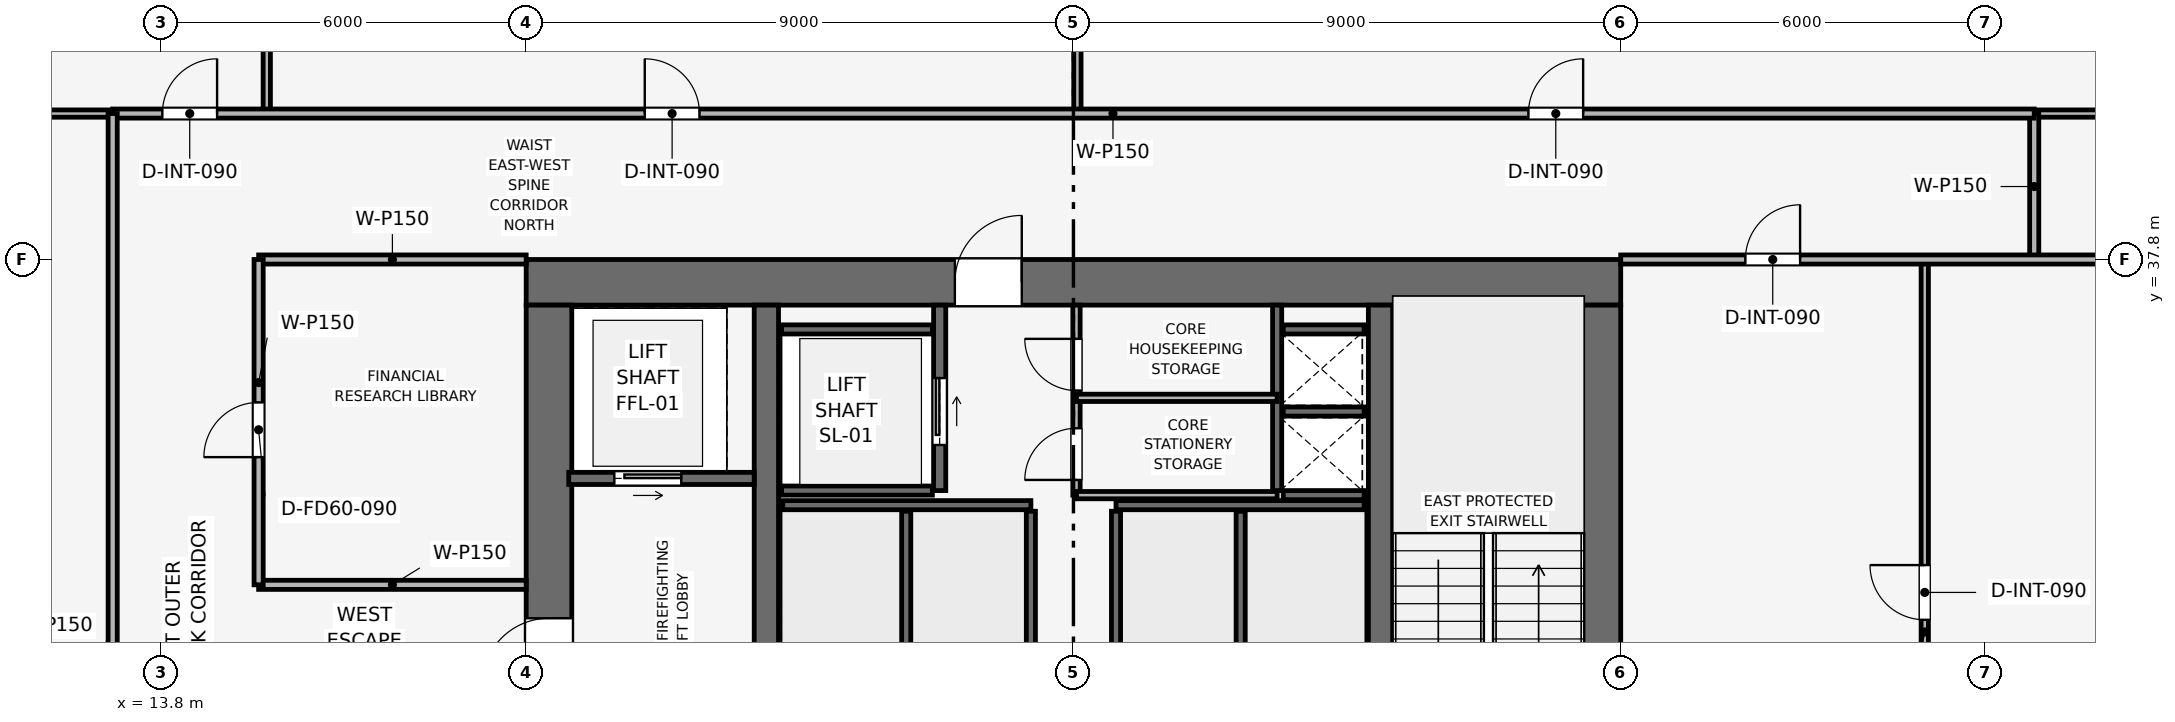
"""IFC4 building model, lengths in metres.
Left out: names, types, materials, properties, quantities, classifications, styles, units other than length and angle.
Written with IfcOpenShell. Run it as: python <this file> out.ifc"""

import sys

from ifc_helpers import new_model, si_unit, direction, frame, frame_2d, origin, place, context, subcontext, project, spatial, rectangle, extrude, element, fill, save


model = new_model("IFC4")
c1 = context("Model", 3, precision=1e-05, world=origin(), true_north=direction((0.0, 1.0)))
c2 = subcontext(c1, "Body", "Model", "MODEL_VIEW")
j1 = project(units=[si_unit("LENGTHUNIT", "METRE"), si_unit("PLANEANGLEUNIT", "RADIAN")], contexts=[c1])
p1 = place(None, origin())
s1 = spatial("IfcSite", under=j1, at=p1, CompositionType="ELEMENT")
p2 = place(p1, origin())
s2 = spatial("IfcBuilding", under=s1, at=p2, CompositionType="ELEMENT")
p3 = place(p2, frame((0.0, 0.0, 211.2)))
s3 = spatial("IfcBuildingStorey", under=s2, at=p3, CompositionType="ELEMENT", Elevation=211.2)
p4 = place(p3, frame((19.8, 37.425, 0.0), z_axis=(0.0, 0.0, 1.0), x_axis=(1.0, 0.0, 0.0)))
e1 = element("IfcWall", 1, at=p4, inside=s3, PredefinedType="SHEAR", context=c2, shape_type="SweptSolid", body=[
    extrude(rectangle(XDim=18.0, YDim=0.75, at=frame_2d((9.0, 0.0))), origin(), (0.0, 0.0, 1.0), 3.75),
])
p5 = place(p4, frame((7.05, 0.0, 0.0)))
e2 = element("IfcOpeningElement", 2, at=p5, cuts=e1, PredefinedType="OPENING", context=c2, shape_type="SweptSolid", body=[
    extrude(rectangle(XDim=1.1, YDim=2.15, at=frame_2d((0.55, 1.075))), frame((0.0, 0.385, 0.0), z_axis=(0.0, -1.0, 0.0), x_axis=(1.0, 0.0, 0.0)), (0.0, 0.0, 1.0), 0.77),
])
p6 = place(p3, frame((20.175, 20.55, 0.0), z_axis=(0.0, 0.0, 1.0), x_axis=(0.0, 1.0, 0.0)))
e3 = element("IfcWall", 3, at=p6, inside=s3, PredefinedType="SHEAR", context=c2, shape_type="SweptSolid", body=[
    extrude(rectangle(XDim=16.5, YDim=0.75, at=frame_2d((8.25, 0.0))), origin(), (0.0, 0.0, 1.0), 3.75),
])
p7 = place(p6, frame((10.25, 0.0, 0.0)))
e4 = element("IfcOpeningElement", 4, at=p7, cuts=e3, PredefinedType="OPENING", context=c2, shape_type="SweptSolid", body=[
    extrude(rectangle(XDim=1.1, YDim=2.15, at=frame_2d((0.55, 1.075))), frame((0.0, 0.385, 0.0), z_axis=(0.0, -1.0, 0.0), x_axis=(1.0, 0.0, 0.0)), (0.0, 0.0, 1.0), 0.77),
])
p8 = place(p3, frame((37.425, 20.55, 0.0), z_axis=(0.0, 0.0, 1.0), x_axis=(0.0, 1.0, 0.0)))
e5 = element("IfcWall", 5, at=p8, inside=s3, PredefinedType="SHEAR", context=c2, shape_type="SweptSolid", body=[
    extrude(rectangle(XDim=16.5, YDim=0.75, at=frame_2d((8.25, 0.0))), origin(), (0.0, 0.0, 1.0), 3.75),
])
p9 = place(p8, frame((4.75, 0.0, 0.0)))
e6 = element("IfcOpeningElement", 6, at=p9, cuts=e5, PredefinedType="OPENING", context=c2, shape_type="SweptSolid", body=[
    extrude(rectangle(XDim=1.1, YDim=2.15, at=frame_2d((0.55, 1.075))), frame((0.0, 0.385, 0.0), z_axis=(0.0, -1.0, 0.0), x_axis=(1.0, 0.0, 0.0)), (0.0, 0.0, 1.0), 0.77),
])
for number, where, z_axis, x_axis in (
    (7, (23.75, 20.55, 0.0), (0.0, 0.0, 1.0), (0.0, 1.0, 0.0)),
    (8, (33.85, 20.55, 0.0), (0.0, 0.0, 1.0), (0.0, 1.0, 0.0)),
):
    element("IfcWall", number, at=place(p3, frame(where, z_axis=z_axis, x_axis=x_axis)), inside=s3, PredefinedType="SHEAR", context=c2, shape_type="SweptSolid", body=[
        extrude(rectangle(XDim=16.5, YDim=0.4, at=frame_2d((8.25, 0.0))), origin(), (0.0, 0.0, 1.0), 3.75),
    ])
p10 = place(p3, frame((32.15, 34.0, 0.0), z_axis=(0.0, 0.0, 1.0), x_axis=(0.0, 1.0, 0.0)))
e9 = element("IfcWall", 9, at=p10, inside=s3, PredefinedType="SHEAR", context=c2, shape_type="SweptSolid", body=[
    extrude(rectangle(XDim=3.05, YDim=0.15, at=frame_2d((1.525, 0.0))), origin(), (0.0, 0.0, 1.0), 3.5),
])
for number, where, z_axis, x_axis in (
    (10, (32.25, 33.925, 0.0), (0.0, 0.0, 1.0), (1.0, 0.0, 0.0)),
    (11, (32.25, 35.3, 0.0), (0.0, 0.0, 1.0), (1.0, 0.0, 0.0)),
):
    element("IfcWall", number, at=place(p3, frame(where, z_axis=z_axis, x_axis=x_axis)), inside=s3, PredefinedType="SHEAR", context=c2, shape_type="SweptSolid", body=[
        extrude(rectangle(XDim=1.33, YDim=0.15, at=frame_2d((0.665, 0.0))), origin(), (0.0, 0.0, 1.0), 3.5),
    ])
p11 = place(p3, frame((20.5, 34.2, 0.0), z_axis=(0.0, 0.0, 1.0), x_axis=(1.0, 0.0, 0.0)))
e12 = element("IfcWall", 12, at=p11, inside=s3, PredefinedType="SHEAR", context=c2, shape_type="SweptSolid", body=[
    extrude(rectangle(XDim=3.05, YDim=0.2, at=frame_2d((1.525, 0.0))), origin(), (0.0, 0.0, 1.0), 3.5),
])
p12 = place(p11, frame((0.75, 0.0, 0.0)))
e13 = element("IfcOpeningElement", 13, at=p12, cuts=e12, PredefinedType="OPENING", context=c2, shape_type="SweptSolid", body=[
    extrude(rectangle(XDim=1.1, YDim=2.15, at=frame_2d((0.55, 1.075))), frame((0.0, 0.11, 0.0), z_axis=(0.0, -1.0, 0.0), x_axis=(1.0, 0.0, 0.0)), (0.0, 0.0, 1.0), 0.22),
])
p13 = place(p3, frame((26.6, 34.0, 0.0), z_axis=(0.0, 0.0, 1.0), x_axis=(0.0, 1.0, 0.0)))
e14 = element("IfcWall", 14, at=p13, inside=s3, PredefinedType="SHEAR", context=c2, shape_type="SweptSolid", body=[
    extrude(rectangle(XDim=3.05, YDim=0.2, at=frame_2d((1.525, 0.0))), origin(), (0.0, 0.0, 1.0), 3.5),
])
p14 = place(p13, frame((0.75, 0.0, 0.0)))
e15 = element("IfcOpeningElement", 15, at=p14, cuts=e14, PredefinedType="OPENING", context=c2, shape_type="SweptSolid", body=[
    extrude(rectangle(XDim=1.1, YDim=2.15, at=frame_2d((0.55, 1.075))), frame((0.0, 0.11, 0.0), z_axis=(0.0, -1.0, 0.0), x_axis=(1.0, 0.0, 0.0)), (0.0, 0.0, 1.0), 0.22),
])
for number, where, z_axis, x_axis in (
    (16, (24.0, 34.0, 0.0), (0.0, 0.0, 1.0), (1.0, 0.0, 0.0)),
    (17, (24.0, 36.65, 0.0), (0.0, 0.0, 1.0), (1.0, 0.0, 0.0)),
):
    element("IfcWall", number, at=place(p3, frame(where, z_axis=z_axis, x_axis=x_axis)), inside=s3, PredefinedType="SHEAR", context=c2, shape_type="SweptSolid", body=[
        extrude(rectangle(XDim=2.48, YDim=0.15, at=frame_2d((1.24, 0.0))), origin(), (0.0, 0.0, 1.0), 3.5),
    ])
p15 = place(p3, frame((32.25, 36.65, 0.0), z_axis=(0.0, 0.0, 1.0), x_axis=(1.0, 0.0, 0.0)))
e18 = element("IfcWall", 18, at=p15, inside=s3, PredefinedType="SHEAR", context=c2, shape_type="SweptSolid", body=[
    extrude(rectangle(XDim=1.33, YDim=0.15, at=frame_2d((0.665, 0.0))), origin(), (0.0, 0.0, 1.0), 3.5),
])
for number, where, z_axis, x_axis in (
    (19, (24.02, 33.76, 0.0), (0.0, 0.0, 1.0), (1.0, 0.0, 0.0)),
    (20, (29.5, 33.76, 0.0), (0.0, 0.0, 1.0), (1.0, 0.0, 0.0)),
):
    element("IfcWall", number, at=place(p3, frame(where, z_axis=z_axis, x_axis=x_axis)), inside=s3, PredefinedType="SHEAR", context=c2, shape_type="SweptSolid", body=[
        extrude(rectangle(XDim=4.08, YDim=0.15, at=frame_2d((2.04, 0.0))), origin(), (0.0, 0.0, 1.0), 3.5),
    ])
for number, where, z_axis, x_axis in (
    (21, (26.05, 31.42, 0.0), (0.0, 0.0, 1.0), (0.0, 1.0, 0.0)),
    (22, (28.1, 31.42, 0.0), (0.0, 0.0, 1.0), (0.0, 1.0, 0.0)),
    (23, (29.5, 31.42, 0.0), (0.0, 0.0, 1.0), (0.0, 1.0, 0.0)),
    (24, (31.55, 31.42, 0.0), (0.0, 0.0, 1.0), (0.0, 1.0, 0.0)),
):
    element("IfcWall", number, at=place(p3, frame(where, z_axis=z_axis, x_axis=x_axis)), inside=s3, PredefinedType="SHEAR", context=c2, shape_type="SweptSolid", body=[
        extrude(rectangle(XDim=2.24, YDim=0.15, at=frame_2d((1.12, 0.0))), origin(), (0.0, 0.0, 1.0), 3.5),
    ])
p16 = place(p3, frame((28.85, 33.925, 0.0), z_axis=(0.0, 0.0, 1.0), x_axis=(0.0, 1.0, 0.0)))
e25 = element("IfcWall", 25, at=p16, inside=s3, PredefinedType="PARTITIONING", context=c2, shape_type="SweptSolid", body=[
    extrude(rectangle(XDim=3.125, YDim=0.12, at=frame_2d((1.562, 0.0))), origin(), (0.0, 0.0, 1.0), 3.5),
])
p17 = place(p16, frame((0.25, 0.0, 0.0)))
e26 = element("IfcOpeningElement", 26, at=p17, cuts=e25, PredefinedType="OPENING", context=c2, shape_type="SweptSolid", body=[
    extrude(rectangle(XDim=0.85, YDim=2.1, at=frame_2d((0.425, 1.05))), frame((0.0, 0.07, 0.0), z_axis=(0.0, -1.0, 0.0), x_axis=(1.0, 0.0, 0.0)), (0.0, 0.0, 1.0), 0.14),
])
p18 = place(p16, frame((1.72, 0.0, 0.0)))
e27 = element("IfcOpeningElement", 27, at=p18, cuts=e25, PredefinedType="OPENING", context=c2, shape_type="SweptSolid", body=[
    extrude(rectangle(XDim=0.85, YDim=2.1, at=frame_2d((0.425, 1.05))), frame((0.0, 0.07, 0.0), z_axis=(0.0, -1.0, 0.0), x_axis=(1.0, 0.0, 0.0)), (0.0, 0.0, 1.0), 0.14),
])
for number, where, z_axis, x_axis in (
    (28, (28.85, 35.525, 0.0), (0.0, 0.0, 1.0), (1.0, 0.0, 0.0)),
    (29, (28.85, 33.925, 0.0), (0.0, 0.0, 1.0), (1.0, 0.0, 0.0)),
):
    element("IfcWall", number, at=place(p3, frame(where, z_axis=z_axis, x_axis=x_axis)), inside=s3, PredefinedType="PARTITIONING", context=c2, shape_type="SweptSolid", body=[
        extrude(rectangle(XDim=3.3, YDim=0.12, at=frame_2d((1.65, 0.0))), origin(), (0.0, 0.0, 1.0), 3.5),
    ])
p19 = place(p3, frame((15.4, 32.45, 0.0), z_axis=(0.0, 0.0, 1.0), x_axis=(1.0, 0.0, 0.0)))
e30 = element("IfcWall", 30, at=p19, inside=s3, PredefinedType="PARTITIONING", context=c2, shape_type="SweptSolid", body=[
    extrude(rectangle(XDim=4.4, YDim=0.15, at=frame_2d((2.2, 0.0))), origin(), (0.0, 0.0, 1.0), 3.5),
])
p20 = place(p3, frame((15.4, 37.8, 0.0), z_axis=(0.0, 0.0, 1.0), x_axis=(1.0, 0.0, 0.0)))
e31 = element("IfcWall", 31, at=p20, inside=s3, PredefinedType="PARTITIONING", context=c2, shape_type="SweptSolid", body=[
    extrude(rectangle(XDim=4.4, YDim=0.15, at=frame_2d((2.2, 0.0))), origin(), (0.0, 0.0, 1.0), 3.035),
])
p21 = place(p3, frame((15.4, 32.45, 0.0), z_axis=(0.0, 0.0, 1.0), x_axis=(0.0, 1.0, 0.0)))
e32 = element("IfcWall", 32, at=p21, inside=s3, PredefinedType="PARTITIONING", context=c2, shape_type="SweptSolid", body=[
    extrude(rectangle(XDim=5.35, YDim=0.15, at=frame_2d((2.675, 0.0))), origin(), (0.0, 0.0, 1.0), 3.035),
])
p22 = place(p21, frame((2.1, 0.0, 0.0)))
e33 = element("IfcOpeningElement", 33, at=p22, cuts=e32, PredefinedType="OPENING", context=c2, shape_type="SweptSolid", body=[
    extrude(rectangle(XDim=0.9, YDim=2.1, at=frame_2d((0.45, 1.05))), frame((0.0, 0.085, 0.0), z_axis=(0.0, -1.0, 0.0), x_axis=(1.0, 0.0, 0.0)), (0.0, 0.0, 1.0), 0.17),
])
p23 = place(p3, frame((15.534, 40.2, 0.0), z_axis=(0.0, 0.0, 1.0), x_axis=(0.0, 1.0, 0.0)))
e34 = element("IfcWall", 34, at=p23, inside=s3, PredefinedType="PARTITIONING", context=c2, shape_type="SweptSolid", body=[
    extrude(rectangle(XDim=15.47, YDim=0.12, at=frame_2d((7.735, 0.0))), origin(), (0.0, 0.0, 1.0), 2.885),
])
p24 = place(p3, frame((28.865, 40.2, 0.0), z_axis=(0.0, 0.0, 1.0), x_axis=(0.0, 1.0, 0.0)))
e35 = element("IfcWall", 35, at=p24, inside=s3, PredefinedType="PARTITIONING", context=c2, shape_type="SweptSolid", body=[
    extrude(rectangle(XDim=15.47, YDim=0.12, at=frame_2d((7.735, 0.0))), origin(), (0.0, 0.0, 1.0), 2.985),
])
p25 = place(p3, frame((42.8, 26.85, 0.0), z_axis=(0.0, 0.0, 1.0), x_axis=(0.0, 1.0, 0.0)))
e36 = element("IfcWall", 36, at=p25, inside=s3, PredefinedType="PARTITIONING", context=c2, shape_type="SweptSolid", body=[
    extrude(rectangle(XDim=10.95, YDim=0.12, at=frame_2d((5.475, 0.0))), origin(), (0.0, 0.0, 1.0), 3.035),
])
p26 = place(p25, frame((5.025, 0.0, 0.0)))
e37 = element("IfcOpeningElement", 37, at=p26, cuts=e36, PredefinedType="OPENING", context=c2, shape_type="SweptSolid", body=[
    extrude(rectangle(XDim=0.9, YDim=2.1, at=frame_2d((0.45, 1.05))), frame((0.0, 0.07, 0.0), z_axis=(0.0, -1.0, 0.0), x_axis=(1.0, 0.0, 0.0)), (0.0, 0.0, 1.0), 0.14),
])
p27 = place(p3, frame((1.93, 40.2, 0.0), z_axis=(0.0, 0.0, 1.0), x_axis=(1.0, 0.0, 0.0)))
e38 = element("IfcWall", 38, at=p27, inside=s3, PredefinedType="PARTITIONING", context=c2, shape_type="SweptSolid", body=[
    extrude(rectangle(XDim=11.07, YDim=0.12, at=frame_2d((5.535, 0.0))), origin(), (0.0, 0.0, 1.0), 2.885),
])
p28 = place(p3, frame((44.6, 40.2, 0.0), z_axis=(0.0, 0.0, 1.0), x_axis=(1.0, 0.0, 0.0)))
e39 = element("IfcWall", 39, at=p28, inside=s3, PredefinedType="PARTITIONING", context=c2, shape_type="SweptSolid", body=[
    extrude(rectangle(XDim=11.07, YDim=0.12, at=frame_2d((5.535, 0.0))), origin(), (0.0, 0.0, 1.0), 2.885),
])
p29 = place(p3, frame((44.6, 37.8, 0.0), z_axis=(0.0, 0.0, 1.0), x_axis=(0.0, 1.0, 0.0)))
e40 = element("IfcWall", 40, at=p29, inside=s3, PredefinedType="PARTITIONING", context=c2, shape_type="SweptSolid", body=[
    extrude(rectangle(XDim=2.4, YDim=0.15, at=frame_2d((1.2, 0.0))), origin(), (0.0, 0.0, 1.0), 3.5),
])
p30 = place(p3, frame((37.8, 37.8, 0.0), z_axis=(0.0, 0.0, 1.0), x_axis=(1.0, 0.0, 0.0)))
e41 = element("IfcWall", 41, at=p30, inside=s3, PredefinedType="PARTITIONING", context=c2, shape_type="SweptSolid", body=[
    extrude(rectangle(XDim=17.87, YDim=0.15, at=frame_2d((8.935, 0.0))), origin(), (0.0, 0.0, 1.0), 2.885),
])
p31 = place(p30, frame((2.05, 0.0, 0.0)))
e42 = element("IfcOpeningElement", 42, at=p31, cuts=e41, PredefinedType="OPENING", context=c2, shape_type="SweptSolid", body=[
    extrude(rectangle(XDim=0.9, YDim=2.1, at=frame_2d((0.45, 1.05))), frame((0.0, 0.085, 0.0), z_axis=(0.0, -1.0, 0.0), x_axis=(1.0, 0.0, 0.0)), (0.0, 0.0, 1.0), 0.17),
])
p32 = place(p3, frame((13.0, 40.2, 0.0), z_axis=(0.0, 0.0, 1.0), x_axis=(1.0, 0.0, 0.0)))
e43 = element("IfcWall", 43, at=p32, inside=s3, PredefinedType="PARTITIONING", context=c2, shape_type="SweptSolid", body=[
    extrude(rectangle(XDim=31.6, YDim=0.15, at=frame_2d((15.8, 0.0))), origin(), (0.0, 0.0, 1.0), 3.035),
])
p33 = place(p32, frame((0.817, 0.0, 0.0)))
e44 = element("IfcOpeningElement", 44, at=p33, cuts=e43, PredefinedType="OPENING", context=c2, shape_type="SweptSolid", body=[
    extrude(rectangle(XDim=0.9, YDim=2.1, at=frame_2d((0.45, 1.05))), frame((0.0, 0.085, 0.0), z_axis=(0.0, -1.0, 0.0), x_axis=(1.0, 0.0, 0.0)), (0.0, 0.0, 1.0), 0.17),
])
p34 = place(p32, frame((8.75, 0.0, 0.0)))
e45 = element("IfcOpeningElement", 45, at=p34, cuts=e43, PredefinedType="OPENING", context=c2, shape_type="SweptSolid", body=[
    extrude(rectangle(XDim=0.9, YDim=2.1, at=frame_2d((0.45, 1.05))), frame((0.0, 0.085, 0.0), z_axis=(0.0, -1.0, 0.0), x_axis=(1.0, 0.0, 0.0)), (0.0, 0.0, 1.0), 0.17),
])
p35 = place(p32, frame((23.282, 0.0, 0.0)))
e46 = element("IfcOpeningElement", 46, at=p35, cuts=e43, PredefinedType="OPENING", context=c2, shape_type="SweptSolid", body=[
    extrude(rectangle(XDim=0.9, YDim=2.1, at=frame_2d((0.45, 1.05))), frame((0.0, 0.085, 0.0), z_axis=(0.0, -1.0, 0.0), x_axis=(1.0, 0.0, 0.0)), (0.0, 0.0, 1.0), 0.17),
])
p36 = place(p3, frame((13.0, 17.4, 0.0), z_axis=(0.0, 0.0, 1.0), x_axis=(0.0, 1.0, 0.0)))
e47 = element("IfcWall", 47, at=p36, inside=s3, PredefinedType="PARTITIONING", context=c2, shape_type="SweptSolid", body=[
    extrude(rectangle(XDim=22.8, YDim=0.15, at=frame_2d((11.4, 0.0))), origin(), (0.0, 0.0, 1.0), 3.035),
])
p37 = place(p36, frame((10.95, 0.0, 0.0)))
e48 = element("IfcOpeningElement", 48, at=p37, cuts=e47, PredefinedType="OPENING", context=c2, shape_type="SweptSolid", body=[
    extrude(rectangle(XDim=0.9, YDim=2.1, at=frame_2d((0.45, 1.05))), frame((0.0, 0.085, 0.0), z_axis=(0.0, -1.0, 0.0), x_axis=(1.0, 0.0, 0.0)), (0.0, 0.0, 1.0), 0.17),
])
p38 = place(p12, origin())
e49 = element("IfcDoor", 49, at=p38, inside=s3, OperationType="SLIDING_TO_RIGHT", PredefinedType="DOOR", context=c2, shape_type="SweptSolid", body=[
    extrude(rectangle(XDim=1.1, YDim=2.15, at=frame_2d((0.55, 1.075))), frame((0.0, 0.025, 0.0), z_axis=(0.0, -1.0, 0.0), x_axis=(1.0, 0.0, 0.0)), (0.0, 0.0, 1.0), 0.05),
])
fill(e13, e49)
p39 = place(p14, origin())
e50 = element("IfcDoor", 50, at=p39, inside=s3, OperationType="SLIDING_TO_RIGHT", PredefinedType="DOOR", context=c2, shape_type="SweptSolid", body=[
    extrude(rectangle(XDim=1.1, YDim=2.15, at=frame_2d((0.55, 1.075))), frame((0.0, 0.025, 0.0), z_axis=(0.0, -1.0, 0.0), x_axis=(1.0, 0.0, 0.0)), (0.0, 0.0, 1.0), 0.05),
])
fill(e15, e50)
p40 = place(p17, origin())
e51 = element("IfcDoor", 51, at=p40, inside=s3, OperationType="SINGLE_SWING_LEFT", PredefinedType="DOOR", context=c2, shape_type="SweptSolid", body=[
    extrude(rectangle(XDim=0.85, YDim=2.1, at=frame_2d((0.425, 1.05))), frame((0.0, 0.025, 0.0), z_axis=(0.0, -1.0, 0.0), x_axis=(1.0, 0.0, 0.0)), (0.0, 0.0, 1.0), 0.05),
])
fill(e26, e51)
p41 = place(p18, origin())
e52 = element("IfcDoor", 52, at=p41, inside=s3, OperationType="SINGLE_SWING_RIGHT", PredefinedType="DOOR", context=c2, shape_type="SweptSolid", body=[
    extrude(rectangle(XDim=0.85, YDim=2.1, at=frame_2d((0.425, 1.05))), frame((0.0, 0.025, 0.0), z_axis=(0.0, -1.0, 0.0), x_axis=(1.0, 0.0, 0.0)), (0.0, 0.0, 1.0), 0.05),
])
fill(e27, e52)
p42 = place(p22, origin())
e53 = element("IfcDoor", 53, at=p42, inside=s3, OperationType="SINGLE_SWING_LEFT", PredefinedType="DOOR", context=c2, shape_type="SweptSolid", body=[
    extrude(rectangle(XDim=0.9, YDim=2.1, at=frame_2d((0.45, 1.05))), frame((0.0, 0.025, 0.0), z_axis=(0.0, -1.0, 0.0), x_axis=(1.0, 0.0, 0.0)), (0.0, 0.0, 1.0), 0.05),
])
fill(e33, e53)
p43 = place(p26, origin())
e54 = element("IfcDoor", 54, at=p43, inside=s3, OperationType="SINGLE_SWING_RIGHT", PredefinedType="DOOR", context=c2, shape_type="SweptSolid", body=[
    extrude(rectangle(XDim=0.9, YDim=2.1, at=frame_2d((0.45, 1.05))), frame((0.0, 0.025, 0.0), z_axis=(0.0, -1.0, 0.0), x_axis=(1.0, 0.0, 0.0)), (0.0, 0.0, 1.0), 0.05),
])
fill(e37, e54)
p44 = place(p31, origin())
e55 = element("IfcDoor", 55, at=p44, inside=s3, OperationType="SINGLE_SWING_RIGHT", PredefinedType="DOOR", context=c2, shape_type="SweptSolid", body=[
    extrude(rectangle(XDim=0.9, YDim=2.1, at=frame_2d((0.45, 1.05))), frame((0.0, 0.025, 0.0), z_axis=(0.0, -1.0, 0.0), x_axis=(1.0, 0.0, 0.0)), (0.0, 0.0, 1.0), 0.05),
])
fill(e42, e55)
p45 = place(p33, origin())
e56 = element("IfcDoor", 56, at=p45, inside=s3, OperationType="SINGLE_SWING_RIGHT", PredefinedType="DOOR", context=c2, shape_type="SweptSolid", body=[
    extrude(rectangle(XDim=0.9, YDim=2.1, at=frame_2d((0.45, 1.05))), frame((0.0, 0.025, 0.0), z_axis=(0.0, -1.0, 0.0), x_axis=(1.0, 0.0, 0.0)), (0.0, 0.0, 1.0), 0.05),
])
fill(e44, e56)
p46 = place(p34, origin())
e57 = element("IfcDoor", 57, at=p46, inside=s3, OperationType="SINGLE_SWING_LEFT", PredefinedType="DOOR", context=c2, shape_type="SweptSolid", body=[
    extrude(rectangle(XDim=0.9, YDim=2.1, at=frame_2d((0.45, 1.05))), frame((0.0, 0.025, 0.0), z_axis=(0.0, -1.0, 0.0), x_axis=(1.0, 0.0, 0.0)), (0.0, 0.0, 1.0), 0.05),
])
fill(e45, e57)
p47 = place(p35, origin())
e58 = element("IfcDoor", 58, at=p47, inside=s3, OperationType="SINGLE_SWING_RIGHT", PredefinedType="DOOR", context=c2, shape_type="SweptSolid", body=[
    extrude(rectangle(XDim=0.9, YDim=2.1, at=frame_2d((0.45, 1.05))), frame((0.0, 0.025, 0.0), z_axis=(0.0, -1.0, 0.0), x_axis=(1.0, 0.0, 0.0)), (0.0, 0.0, 1.0), 0.05),
])
fill(e46, e58)
p48 = place(p7, origin())
e59 = element("IfcDoor", 59, at=p48, inside=s3, OperationType="SINGLE_SWING_LEFT", PredefinedType="DOOR", context=c2, shape_type="SweptSolid", body=[
    extrude(rectangle(XDim=1.1, YDim=2.15, at=frame_2d((0.55, 1.075))), frame((0.0, 0.025, 0.0), z_axis=(0.0, -1.0, 0.0), x_axis=(1.0, 0.0, 0.0)), (0.0, 0.0, 1.0), 0.05),
])
fill(e4, e59)
p49 = place(p5, origin())
e60 = element("IfcDoor", 60, at=p49, inside=s3, OperationType="SINGLE_SWING_RIGHT", PredefinedType="DOOR", context=c2, shape_type="SweptSolid", body=[
    extrude(rectangle(XDim=1.1, YDim=2.15, at=frame_2d((0.55, 1.075))), frame((0.0, 0.025, 0.0), z_axis=(0.0, -1.0, 0.0), x_axis=(1.0, 0.0, 0.0)), (0.0, 0.0, 1.0), 0.05),
])
fill(e2, e60)
save(model, sys.argv[1])
